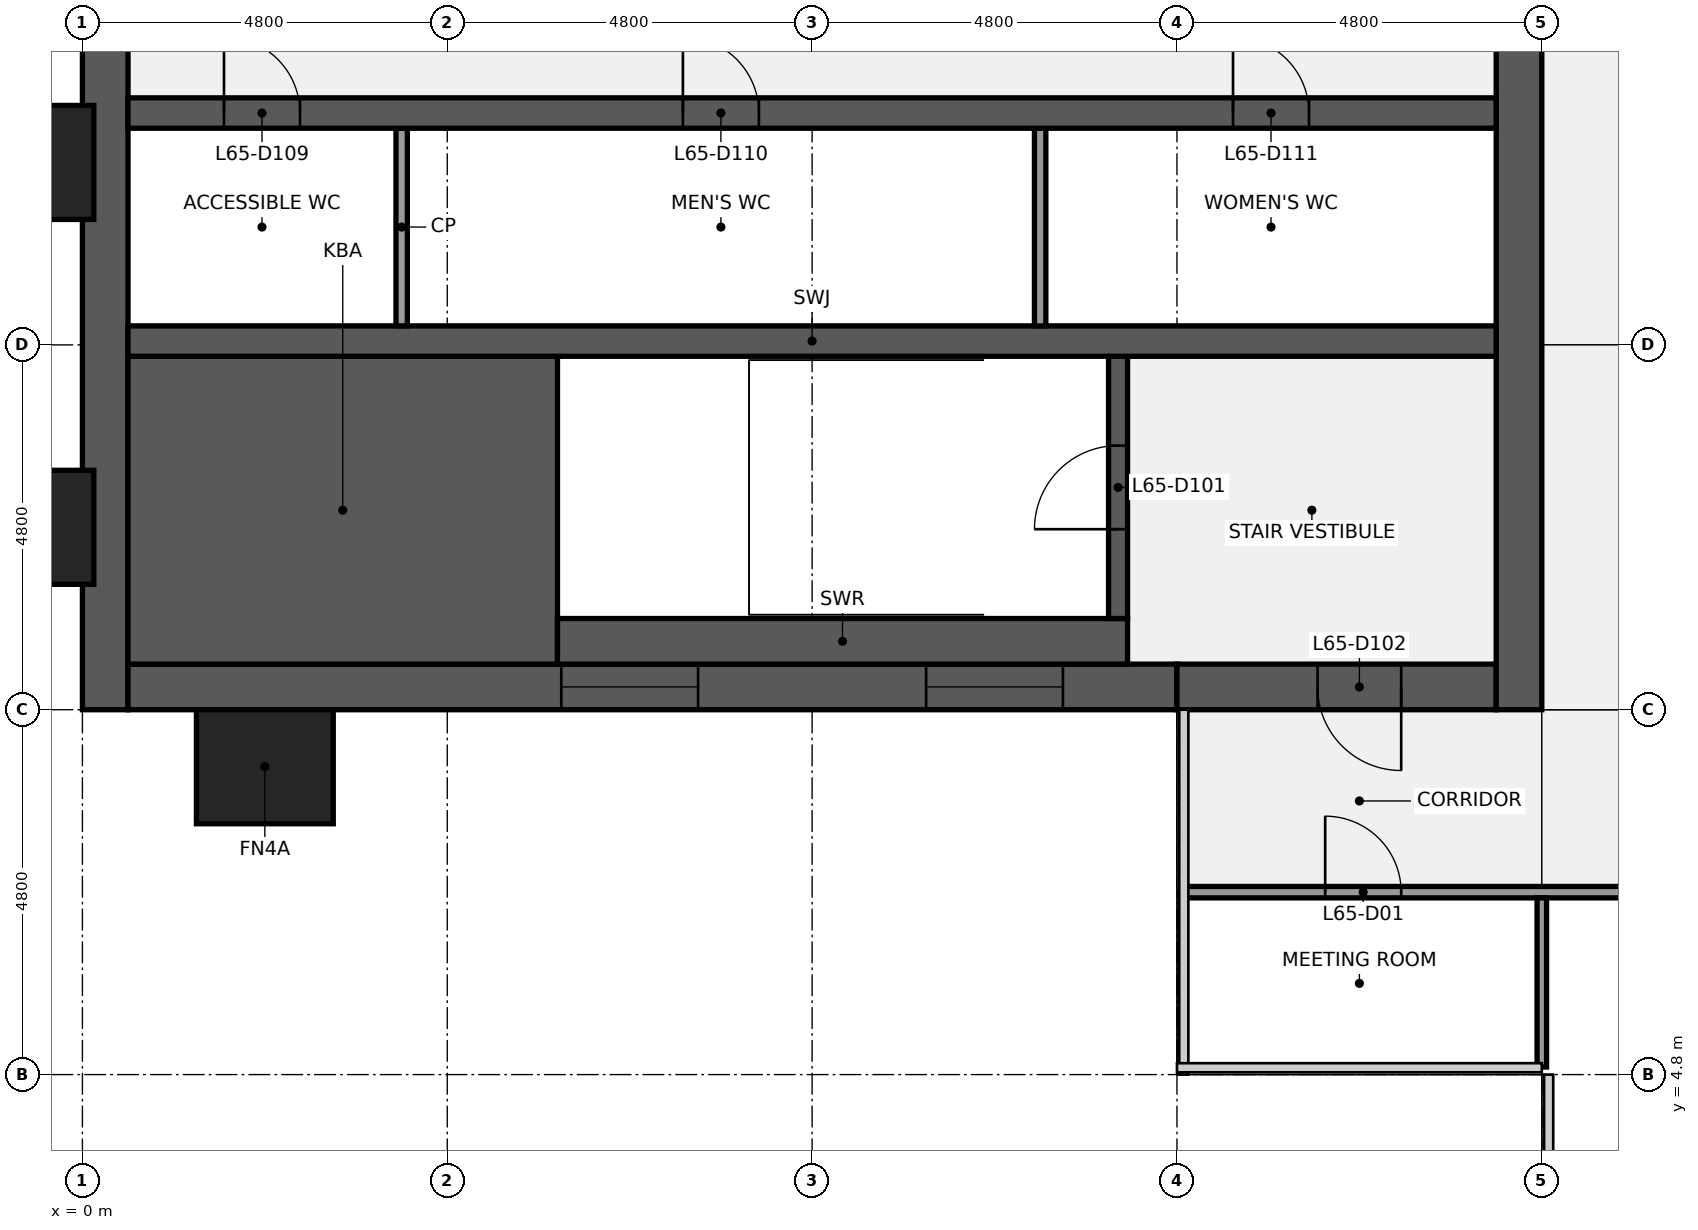
"""IFC4 building model, lengths in metres.
Left out: names, types, materials, properties, quantities, classifications, styles, units other than length and angle.
Written with IfcOpenShell. Run it as: python <this file> out.ifc"""

import sys

from ifc_helpers import new_model, si_unit, direction, frame, frame_2d, origin, origin_2d, place, context, subcontext, project, spatial, rectangle, extrude, element, fill, save


model = new_model("IFC4")
c1 = context("Model", 3, precision=1e-05, world=origin(), true_north=direction((0.0, 1.0)))
c2 = subcontext(c1, "Body", "Model", "MODEL_VIEW")
j1 = project(units=[si_unit("LENGTHUNIT", "METRE"), si_unit("PLANEANGLEUNIT", "RADIAN")], contexts=[c1])
p1 = place(None, origin())
s1 = spatial("IfcSite", under=j1, at=p1, CompositionType="ELEMENT")
p2 = place(p1, origin())
s2 = spatial("IfcBuilding", under=s1, at=p2, CompositionType="ELEMENT")
p3 = place(p2, frame((0.0, 0.0, 298.3)))
s3 = spatial("IfcBuildingStorey", under=s2, at=p3, CompositionType="ELEMENT", Elevation=298.3)
p4 = place(p3, frame((0.3, 9.6, 0.0), z_axis=(0.0, 0.0, 1.0), x_axis=(0.0, 1.0, 0.0)))
e1 = element("IfcWall", 1, at=p4, inside=s3, PredefinedType="SHEAR", context=c2, shape_type="SweptSolid", body=[
    extrude(rectangle(XDim=28.8, YDim=0.6, at=frame_2d((14.4, 0.0))), origin(), (0.0, 0.0, 1.0), 3.84),
])
p5 = place(p4, frame((8.85, 0.0, 0.9)))
e2 = element("IfcOpeningElement", 2, at=p5, cuts=e1, PredefinedType="OPENING", context=c2, shape_type="SweptSolid", body=[
    extrude(rectangle(XDim=1.5, YDim=1.5, at=frame_2d((0.75, 0.75))), frame((0.0, 0.31, 0.0), z_axis=(0.0, -1.0, 0.0), x_axis=(1.0, 0.0, 0.0)), (0.0, 0.0, 1.0), 0.62),
])
p6 = place(p4, frame((18.45, 0.0, 0.9)))
e3 = element("IfcOpeningElement", 3, at=p6, cuts=e1, PredefinedType="OPENING", context=c2, shape_type="SweptSolid", body=[
    extrude(rectangle(XDim=1.5, YDim=1.5, at=frame_2d((0.75, 0.75))), frame((0.0, 0.31, 0.0), z_axis=(0.0, -1.0, 0.0), x_axis=(1.0, 0.0, 0.0)), (0.0, 0.0, 1.0), 0.62),
])
p7 = place(p3, frame((14.4, 9.9, 0.0), z_axis=(0.0, 0.0, 1.0), x_axis=(-1.0, 0.0, 0.0)))
e4 = element("IfcWall", 4, at=p7, inside=s3, PredefinedType="SHEAR", context=c2, shape_type="SweptSolid", body=[
    extrude(rectangle(XDim=13.8, YDim=0.6, at=frame_2d((6.9, 0.0))), origin(), (0.0, 0.0, 1.0), 3.84),
])
p8 = place(p7, frame((6.3, 0.0, 0.9)))
e5 = element("IfcOpeningElement", 5, at=p8, cuts=e4, PredefinedType="OPENING", context=c2, shape_type="SweptSolid", body=[
    extrude(rectangle(XDim=1.8, YDim=1.5, at=frame_2d((0.9, 0.75))), frame((0.0, 0.31, 0.0), z_axis=(0.0, -1.0, 0.0), x_axis=(1.0, 0.0, 0.0)), (0.0, 0.0, 1.0), 0.62),
])
p9 = place(p7, frame((1.5, 0.0, 0.9)))
e6 = element("IfcOpeningElement", 6, at=p9, cuts=e4, PredefinedType="OPENING", context=c2, shape_type="SweptSolid", body=[
    extrude(rectangle(XDim=1.8, YDim=1.5, at=frame_2d((0.9, 0.75))), frame((0.0, 0.31, 0.0), z_axis=(0.0, -1.0, 0.0), x_axis=(1.0, 0.0, 0.0)), (0.0, 0.0, 1.0), 0.62),
])
p10 = place(p3, frame((18.6, 9.9, 0.0), z_axis=(0.0, 0.0, 1.0), x_axis=(-1.0, 0.0, 0.0)))
e7 = element("IfcWall", 7, at=p10, inside=s3, PredefinedType="SHEAR", context=c2, shape_type="SweptSolid", body=[
    extrude(rectangle(XDim=4.2, YDim=0.6, at=frame_2d((2.1, 0.0))), origin(), (0.0, 0.0, 1.0), 3.84),
])
p11 = place(p10, frame((1.25, 0.0, 0.0)))
e8 = element("IfcOpeningElement", 8, at=p11, cuts=e7, PredefinedType="OPENING", context=c2, shape_type="SweptSolid", body=[
    extrude(rectangle(XDim=1.1, YDim=2.1, at=frame_2d((0.55, 1.05))), frame((0.0, 0.31, 0.0), z_axis=(0.0, -1.0, 0.0), x_axis=(1.0, 0.0, 0.0)), (0.0, 0.0, 1.0), 0.62),
])
p12 = place(p3, frame((18.9, 38.4, 0.0), z_axis=(0.0, 0.0, 1.0), x_axis=(0.0, -1.0, 0.0)))
e9 = element("IfcWall", 9, at=p12, inside=s3, PredefinedType="SHEAR", context=c2, shape_type="SweptSolid", body=[
    extrude(rectangle(XDim=28.8, YDim=0.6, at=frame_2d((14.4, 0.0))), origin(), (0.0, 0.0, 1.0), 3.84),
])
p13 = place(p12, frame((18.3, 0.0, 0.0)))
e10 = element("IfcOpeningElement", 10, at=p13, cuts=e9, PredefinedType="OPENING", context=c2, shape_type="SweptSolid", body=[
    extrude(rectangle(XDim=1.8, YDim=2.1, at=frame_2d((0.9, 1.05))), frame((0.0, 0.31, 0.0), z_axis=(0.0, -1.0, 0.0), x_axis=(1.0, 0.0, 0.0)), (0.0, 0.0, 1.0), 0.62),
])
p14 = place(p12, frame((8.7, 0.0, 0.0)))
e11 = element("IfcOpeningElement", 11, at=p14, cuts=e9, PredefinedType="OPENING", context=c2, shape_type="SweptSolid", body=[
    extrude(rectangle(XDim=1.8, YDim=2.1, at=frame_2d((0.9, 1.05))), frame((0.0, 0.31, 0.0), z_axis=(0.0, -1.0, 0.0), x_axis=(1.0, 0.0, 0.0)), (0.0, 0.0, 1.0), 0.62),
])
p15 = place(p3, frame((0.6, 12.225, 0.0), z_axis=(0.0, 0.0, 1.0), x_axis=(1.0, 0.0, 0.0)))
e12 = element("IfcWall", 12, at=p15, inside=s3, PredefinedType="SHEAR", context=c2, shape_type="SweptSolid", body=[
    extrude(rectangle(XDim=5.65, YDim=4.05, at=frame_2d((2.825, 0.0))), origin(), (0.0, 0.0, 1.0), 3.84),
])
p16 = place(p3, frame((6.25, 10.5, 0.0), z_axis=(0.0, 0.0, 1.0), x_axis=(1.0, 0.0, 0.0)))
e13 = element("IfcWall", 13, at=p16, inside=s3, PredefinedType="SHEAR", context=c2, shape_type="SweptSolid", body=[
    extrude(rectangle(XDim=7.5, YDim=0.6, at=frame_2d((3.75, 0.0))), origin(), (0.0, 0.0, 1.0), 3.84),
])
p17 = place(p3, frame((13.625, 10.8, 0.0), z_axis=(0.0, 0.0, 1.0), x_axis=(0.0, 1.0, 0.0)))
e14 = element("IfcWall", 14, at=p17, inside=s3, PredefinedType="SHEAR", context=c2, shape_type="SweptSolid", body=[
    extrude(rectangle(XDim=3.45, YDim=0.25, at=frame_2d((1.725, 0.0))), origin(), (0.0, 0.0, 1.0), 3.84),
])
p18 = place(p17, frame((1.175, 0.0, 0.0)))
e15 = element("IfcOpeningElement", 15, at=p18, cuts=e14, PredefinedType="OPENING", context=c2, shape_type="SweptSolid", body=[
    extrude(rectangle(XDim=1.1, YDim=2.1, at=frame_2d((0.55, 1.05))), frame((0.0, 0.135, 0.0), z_axis=(0.0, -1.0, 0.0), x_axis=(1.0, 0.0, 0.0)), (0.0, 0.0, 1.0), 0.27),
])
p19 = place(p3, frame((0.6, 14.45, 0.0), z_axis=(0.0, 0.0, 1.0), x_axis=(1.0, 0.0, 0.0)))
e16 = element("IfcWall", 16, at=p19, inside=s3, PredefinedType="SHEAR", context=c2, shape_type="SweptSolid", body=[
    extrude(rectangle(XDim=18.0, YDim=0.4, at=frame_2d((9.0, 0.0))), origin(), (0.0, 0.0, 1.0), 3.84),
])
for number, where, z_axis, x_axis in (
    (17, (4.2, 14.65, 0.0), (0.0, 0.0, 1.0), (0.0, 1.0, 0.0)),
    (18, (12.6, 14.65, 0.0), (0.0, 0.0, 1.0), (0.0, 1.0, 0.0)),
):
    element("IfcWall", number, at=place(p3, frame(where, z_axis=z_axis, x_axis=x_axis)), inside=s3, PredefinedType="PARTITIONING", context=c2, shape_type="SweptSolid", body=[
        extrude(rectangle(XDim=2.6, YDim=0.15, at=frame_2d((1.3, 0.0))), origin(), (0.0, 0.0, 1.0), 3.84),
    ])
p20 = place(p3, frame((0.6, 17.45, 0.0), z_axis=(0.0, 0.0, 1.0), x_axis=(1.0, 0.0, 0.0)))
e19 = element("IfcWall", 19, at=p20, inside=s3, PredefinedType="SHEAR", context=c2, shape_type="SweptSolid", body=[
    extrude(rectangle(XDim=18.0, YDim=0.4, at=frame_2d((9.0, 0.0))), origin(), (0.0, 0.0, 1.0), 3.84),
])
p21 = place(p20, frame((1.262, 0.0, 0.0)))
e20 = element("IfcOpeningElement", 20, at=p21, cuts=e19, PredefinedType="OPENING", context=c2, shape_type="SweptSolid", body=[
    extrude(rectangle(XDim=1.0, YDim=2.1, at=frame_2d((0.5, 1.05))), frame((0.0, 0.21, 0.0), z_axis=(0.0, -1.0, 0.0), x_axis=(1.0, 0.0, 0.0)), (0.0, 0.0, 1.0), 0.42),
])
p22 = place(p20, frame((7.3, 0.0, 0.0)))
e21 = element("IfcOpeningElement", 21, at=p22, cuts=e19, PredefinedType="OPENING", context=c2, shape_type="SweptSolid", body=[
    extrude(rectangle(XDim=1.0, YDim=2.1, at=frame_2d((0.5, 1.05))), frame((0.0, 0.21, 0.0), z_axis=(0.0, -1.0, 0.0), x_axis=(1.0, 0.0, 0.0)), (0.0, 0.0, 1.0), 0.42),
])
p23 = place(p20, frame((14.538, 0.0, 0.0)))
e22 = element("IfcOpeningElement", 22, at=p23, cuts=e19, PredefinedType="OPENING", context=c2, shape_type="SweptSolid", body=[
    extrude(rectangle(XDim=1.0, YDim=2.1, at=frame_2d((0.5, 1.05))), frame((0.0, 0.21, 0.0), z_axis=(0.0, -1.0, 0.0), x_axis=(1.0, 0.0, 0.0)), (0.0, 0.0, 1.0), 0.42),
])
p24 = place(p3, frame((14.5, 7.2, 0.0), z_axis=(0.0, 0.0, 1.0), x_axis=(1.0, 0.0, 0.0)))
e23 = element("IfcWall", 23, at=p24, inside=s3, PredefinedType="PARTITIONING", context=c2, shape_type="SweptSolid", body=[
    extrude(rectangle(XDim=28.6, YDim=0.15, at=frame_2d((14.3, 0.0))), origin(), (0.0, 0.0, 1.0), 2.849),
])
p25 = place(p24, frame((1.85, 0.0, 0.0)))
e24 = element("IfcOpeningElement", 24, at=p25, cuts=e23, PredefinedType="OPENING", context=c2, shape_type="SweptSolid", body=[
    extrude(rectangle(XDim=1.0, YDim=2.1, at=frame_2d((0.5, 1.05))), frame((0.0, 0.085, 0.0), z_axis=(0.0, -1.0, 0.0), x_axis=(1.0, 0.0, 0.0)), (0.0, 0.0, 1.0), 0.17),
])
p26 = place(p24, frame((9.0, 0.0, 0.0)))
e25 = element("IfcOpeningElement", 25, at=p26, cuts=e23, PredefinedType="OPENING", context=c2, shape_type="SweptSolid", body=[
    extrude(rectangle(XDim=1.0, YDim=2.1, at=frame_2d((0.5, 1.05))), frame((0.0, 0.085, 0.0), z_axis=(0.0, -1.0, 0.0), x_axis=(1.0, 0.0, 0.0)), (0.0, 0.0, 1.0), 0.17),
])
p27 = place(p24, frame((18.6, 0.0, 0.0)))
e26 = element("IfcOpeningElement", 26, at=p27, cuts=e23, PredefinedType="OPENING", context=c2, shape_type="SweptSolid", body=[
    extrude(rectangle(XDim=1.0, YDim=2.1, at=frame_2d((0.5, 1.05))), frame((0.0, 0.085, 0.0), z_axis=(0.0, -1.0, 0.0), x_axis=(1.0, 0.0, 0.0)), (0.0, 0.0, 1.0), 0.17),
])
p28 = place(p3, frame((19.2, 4.9, 0.0), z_axis=(0.0, 0.0, 1.0), x_axis=(0.0, 1.0, 0.0)))
e27 = element("IfcWall", 27, at=p28, inside=s3, PredefinedType="PARTITIONING", context=c2, shape_type="SweptSolid", body=[
    extrude(rectangle(XDim=2.225, YDim=0.125, at=frame_2d((1.113, 0.0))), origin(), (0.0, 0.0, 1.0), 2.849),
])
for number, where, z_axis, x_axis in (
    (28, (-0.75, 12.0, 0.0), (0.0, 0.0, 1.0), (0.0, 1.0, 0.0)),
    (29, (-0.75, 16.8, 0.0), (0.0, 0.0, 1.0), (0.0, 1.0, 0.0)),
    (30, (2.4, 8.85, 0.0), (0.0, 0.0, 1.0), (1.0, 0.0, 0.0)),
):
    element("IfcColumn", number, at=place(p3, frame(where, z_axis=z_axis, x_axis=x_axis)), inside=s3, PredefinedType="PILASTER", context=c2, shape_type="SweptSolid", body=[
        extrude(rectangle(XDim=1.8, YDim=1.5, at=origin_2d()), origin(), (0.0, 0.0, 1.0), 4.0),
    ])
p29 = place(p18, origin())
e31 = element("IfcDoor", 31, at=p29, inside=s3, OperationType="SINGLE_SWING_LEFT", PredefinedType="DOOR", context=c2, shape_type="SweptSolid", body=[
    extrude(rectangle(XDim=1.1, YDim=2.1, at=frame_2d((0.55, 1.05))), frame((0.0, 0.025, 0.0), z_axis=(0.0, -1.0, 0.0), x_axis=(1.0, 0.0, 0.0)), (0.0, 0.0, 1.0), 0.05),
])
fill(e15, e31)
p30 = place(p11, origin())
e32 = element("IfcDoor", 32, at=p30, inside=s3, OperationType="SINGLE_SWING_LEFT", PredefinedType="DOOR", context=c2, shape_type="SweptSolid", body=[
    extrude(rectangle(XDim=1.1, YDim=2.1, at=frame_2d((0.55, 1.05))), frame((0.0, 0.025, 0.0), z_axis=(0.0, -1.0, 0.0), x_axis=(1.0, 0.0, 0.0)), (0.0, 0.0, 1.0), 0.05),
])
fill(e8, e32)
p31 = place(p21, origin())
e33 = element("IfcDoor", 33, at=p31, inside=s3, OperationType="SINGLE_SWING_LEFT", PredefinedType="DOOR", context=c2, shape_type="SweptSolid", body=[
    extrude(rectangle(XDim=1.0, YDim=2.1, at=frame_2d((0.5, 1.05))), frame((0.0, 0.025, 0.0), z_axis=(0.0, -1.0, 0.0), x_axis=(1.0, 0.0, 0.0)), (0.0, 0.0, 1.0), 0.05),
])
fill(e20, e33)
p32 = place(p22, origin())
e34 = element("IfcDoor", 34, at=p32, inside=s3, OperationType="SINGLE_SWING_LEFT", PredefinedType="DOOR", context=c2, shape_type="SweptSolid", body=[
    extrude(rectangle(XDim=1.0, YDim=2.1, at=frame_2d((0.5, 1.05))), frame((0.0, 0.025, 0.0), z_axis=(0.0, -1.0, 0.0), x_axis=(1.0, 0.0, 0.0)), (0.0, 0.0, 1.0), 0.05),
])
fill(e21, e34)
p33 = place(p23, origin())
e35 = element("IfcDoor", 35, at=p33, inside=s3, OperationType="SINGLE_SWING_LEFT", PredefinedType="DOOR", context=c2, shape_type="SweptSolid", body=[
    extrude(rectangle(XDim=1.0, YDim=2.1, at=frame_2d((0.5, 1.05))), frame((0.0, 0.025, 0.0), z_axis=(0.0, -1.0, 0.0), x_axis=(1.0, 0.0, 0.0)), (0.0, 0.0, 1.0), 0.05),
])
fill(e22, e35)
p34 = place(p8, origin())
e36 = element("IfcWindow", 36, at=p34, inside=s3, PartitioningType="SINGLE_PANEL", PredefinedType="WINDOW", context=c2, shape_type="SweptSolid", body=[
    extrude(rectangle(XDim=1.8, YDim=1.5, at=frame_2d((0.9, 0.75))), frame((0.0, 0.03, 0.0), z_axis=(0.0, -1.0, 0.0), x_axis=(1.0, 0.0, 0.0)), (0.0, 0.0, 1.0), 0.06),
])
fill(e5, e36)
p35 = place(p9, origin())
e37 = element("IfcWindow", 37, at=p35, inside=s3, PartitioningType="SINGLE_PANEL", PredefinedType="WINDOW", context=c2, shape_type="SweptSolid", body=[
    extrude(rectangle(XDim=1.8, YDim=1.5, at=frame_2d((0.9, 0.75))), frame((0.0, 0.03, 0.0), z_axis=(0.0, -1.0, 0.0), x_axis=(1.0, 0.0, 0.0)), (0.0, 0.0, 1.0), 0.06),
])
fill(e6, e37)
p36 = place(p25, origin())
e38 = element("IfcDoor", 38, at=p36, inside=s3, OperationType="SINGLE_SWING_LEFT", PredefinedType="DOOR", context=c2, shape_type="SweptSolid", body=[
    extrude(rectangle(XDim=1.0, YDim=2.1, at=frame_2d((0.5, 1.05))), frame((0.0, 0.025, 0.0), z_axis=(0.0, -1.0, 0.0), x_axis=(1.0, 0.0, 0.0)), (0.0, 0.0, 1.0), 0.05),
])
fill(e24, e38)
save(model, sys.argv[1])
